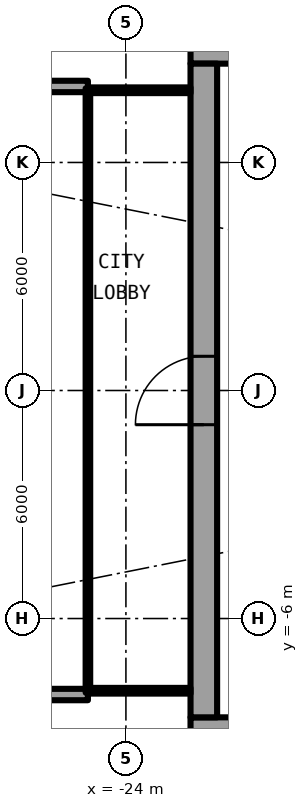
"""IFC4 building model, lengths in metres.
Left out: names, types, materials, properties, quantities, classifications, styles, units other than length and angle.
Written with IfcOpenShell. Run it as: python <this file> out.ifc"""

import sys

from ifc_helpers import new_model, si_unit, direction, frame, frame_2d, origin, place, context, subcontext, project, spatial, rectangle, extrude, element, fill, save


model = new_model("IFC4")
c1 = context("Model", 3, precision=1e-05, world=origin(), true_north=direction((0.0, 1.0)))
c2 = subcontext(c1, "Body", "Model", "MODEL_VIEW")
j1 = project(units=[si_unit("LENGTHUNIT", "METRE"), si_unit("PLANEANGLEUNIT", "RADIAN")], contexts=[c1])
p1 = place(None, origin())
s1 = spatial("IfcSite", under=j1, at=p1, CompositionType="ELEMENT")
p2 = place(p1, origin())
s2 = spatial("IfcBuilding", under=s1, at=p2, CompositionType="ELEMENT")
p3 = place(p2, frame((0.0, 0.0, 75.8)))
s3 = spatial("IfcBuildingStorey", under=s2, at=p3, CompositionType="ELEMENT", Elevation=75.8)
for number, where, z_axis, x_axis in (
    (1, (-25.0, 8.0, 0.0), (0.0, 0.0, 1.0), (-1.0, 0.0, 0.0)),
    (2, (-25.0, -8.0, 0.0), (0.0, 0.0, 1.0), (-1.0, 0.0, 0.0)),
):
    element("IfcWall", number, at=place(p3, frame(where, z_axis=z_axis, x_axis=x_axis)), inside=s3, PredefinedType="SOLIDWALL", context=c2, shape_type="SweptSolid", body=[
        extrude(rectangle(XDim=2.667, YDim=0.3, at=frame_2d((1.333, 0.0))), origin(), (0.0, 0.0, 1.0), 2.7),
    ])
p4 = place(p3, frame((-22.3, -8.95, 0.0), z_axis=(0.0, 0.0, 1.0), x_axis=(1.0, 0.0, 0.0)))
e3 = element("IfcWall", 3, at=p4, inside=s3, PredefinedType="SHEAR", context=c2, shape_type="SweptSolid", body=[
    extrude(rectangle(XDim=14.0, YDim=0.7, at=frame_2d((7.0, 0.0))), origin(), (0.0, 0.0, 1.0), 3.05),
])
p5 = place(p4, frame((1.225, 0.0, 0.0)))
e4 = element("IfcOpeningElement", 4, at=p5, cuts=e3, PredefinedType="OPENING", context=c2, shape_type="SweptSolid", body=[
    extrude(rectangle(XDim=1.2, YDim=2.3, at=frame_2d((0.6, 1.15))), frame((0.0, 0.36, 0.0), z_axis=(0.0, -1.0, 0.0), x_axis=(1.0, 0.0, 0.0)), (0.0, 0.0, 1.0), 0.72),
])
p6 = place(p3, frame((-8.3, 8.95, 0.0), z_axis=(0.0, 0.0, 1.0), x_axis=(-1.0, 0.0, 0.0)))
e5 = element("IfcWall", 5, at=p6, inside=s3, PredefinedType="SHEAR", context=c2, shape_type="SweptSolid", body=[
    extrude(rectangle(XDim=14.0, YDim=0.7, at=frame_2d((7.0, 0.0))), origin(), (0.0, 0.0, 1.0), 3.05),
])
p7 = place(p6, frame((11.575, 0.0, 0.0)))
e6 = element("IfcOpeningElement", 6, at=p7, cuts=e5, PredefinedType="OPENING", context=c2, shape_type="SweptSolid", body=[
    extrude(rectangle(XDim=1.2, YDim=2.3, at=frame_2d((0.6, 1.15))), frame((0.0, 0.36, 0.0), z_axis=(0.0, -1.0, 0.0), x_axis=(1.0, 0.0, 0.0)), (0.0, 0.0, 1.0), 0.72),
])
p8 = place(p3, frame((-21.95, -8.6, 0.0), z_axis=(0.0, 0.0, 1.0), x_axis=(0.0, 1.0, 0.0)))
e7 = element("IfcWall", 7, at=p8, inside=s3, PredefinedType="SHEAR", context=c2, shape_type="SweptSolid", body=[
    extrude(rectangle(XDim=17.2, YDim=0.7, at=frame_2d((8.6, 0.0))), origin(), (0.0, 0.0, 1.0), 3.05),
])
p9 = place(p8, frame((7.7, 0.0, 0.0)))
e8 = element("IfcOpeningElement", 8, at=p9, cuts=e7, PredefinedType="OPENING", context=c2, shape_type="SweptSolid", body=[
    extrude(rectangle(XDim=1.8, YDim=2.3, at=frame_2d((0.9, 1.15))), frame((0.0, 0.36, 0.0), z_axis=(0.0, -1.0, 0.0), x_axis=(1.0, 0.0, 0.0)), (0.0, 0.0, 1.0), 0.72),
])
for number, where, z_axis, x_axis in (
    (9, (-22.3, 7.9, 0.0), (0.0, 0.0, 1.0), (-1.0, 0.0, 0.0)),
    (10, (-22.3, -7.9, 0.0), (0.0, 0.0, 1.0), (-1.0, 0.0, 0.0)),
):
    element("IfcWall", number, at=place(p3, frame(where, z_axis=z_axis, x_axis=x_axis)), inside=s3, PredefinedType="PARTITIONING", context=c2, shape_type="SweptSolid", body=[
        extrude(rectangle(XDim=2.64, YDim=0.15, at=frame_2d((1.32, 0.0))), origin(), (0.0, 0.0, 1.0), 2.7),
    ])
p10 = place(p3, frame((-25.0, 7.95, 0.0), z_axis=(0.0, 0.0, 1.0), x_axis=(0.0, -1.0, 0.0)))
e11 = element("IfcWall", 11, at=p10, inside=s3, PredefinedType="PARTITIONING", context=c2, shape_type="SweptSolid", body=[
    extrude(rectangle(XDim=15.9, YDim=0.12, at=frame_2d((7.95, 0.0))), origin(), (0.0, 0.0, 1.0), 2.7),
])
p11 = place(p10, frame((0.95, 0.0, 0.1)))
e12 = element("IfcOpeningElement", 12, at=p11, cuts=e11, PredefinedType="OPENING", context=c2, shape_type="SweptSolid", body=[
    extrude(rectangle(XDim=14.0, YDim=2.35, at=frame_2d((7.0, 1.175))), frame((0.0, 0.07, 0.0), z_axis=(0.0, -1.0, 0.0), x_axis=(1.0, 0.0, 0.0)), (0.0, 0.0, 1.0), 0.14),
])
p12 = place(p9, origin())
e13 = element("IfcDoor", 13, at=p12, inside=s3, OperationType="SINGLE_SWING_LEFT", PredefinedType="DOOR", context=c2, shape_type="SweptSolid", body=[
    extrude(rectangle(XDim=1.8, YDim=2.3, at=frame_2d((0.9, 1.15))), frame((0.0, 0.025, 0.0), z_axis=(0.0, -1.0, 0.0), x_axis=(1.0, 0.0, 0.0)), (0.0, 0.0, 1.0), 0.05),
])
fill(e8, e13)
p13 = place(p11, origin())
e14 = element("IfcWindow", 14, at=p13, inside=s3, PartitioningType="SINGLE_PANEL", PredefinedType="WINDOW", context=c2, shape_type="SweptSolid", body=[
    extrude(rectangle(XDim=14.0, YDim=2.35, at=frame_2d((7.0, 1.175))), frame((0.0, 0.03, 0.0), z_axis=(0.0, -1.0, 0.0), x_axis=(1.0, 0.0, 0.0)), (0.0, 0.0, 1.0), 0.06),
])
fill(e12, e14)
save(model, sys.argv[1])
